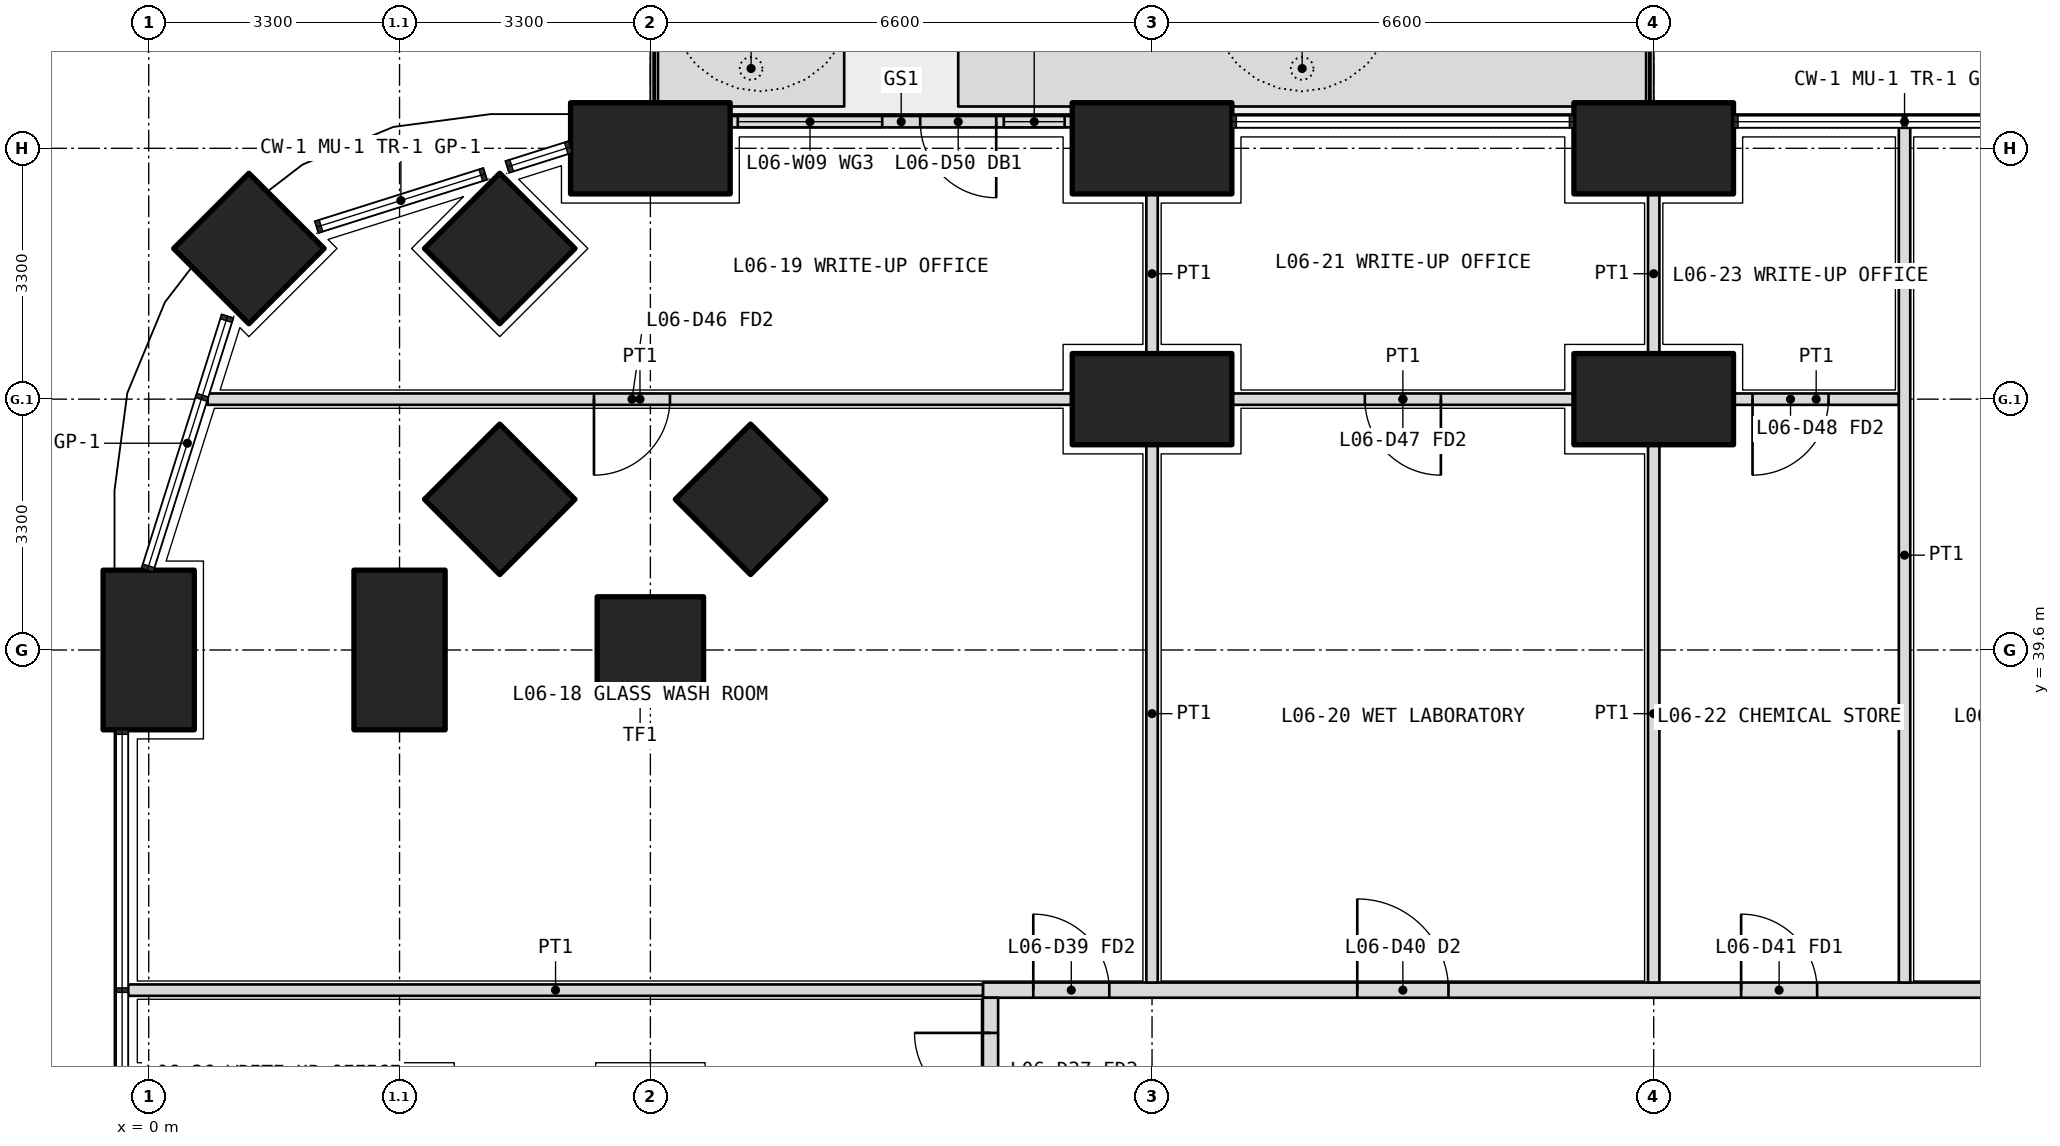
"""IFC4 building model, lengths in metres.
Left out: names, types, materials, properties, quantities, classifications, styles, units other than length and angle.
Written with IfcOpenShell. Run it as: python <this file> out.ifc"""

import sys

from ifc_helpers import new_model, si_unit, direction, frame, frame_2d, origin, origin_2d, place, context, subcontext, project, spatial, polyline, rectangle, outline, extrude, element, fill, save


model = new_model("IFC4")
c1 = context("Model", 3, precision=1e-05, world=origin(), true_north=direction((0.0, 1.0)))
c2 = subcontext(c1, "Body", "Model", "MODEL_VIEW")
j1 = project(units=[si_unit("LENGTHUNIT", "METRE"), si_unit("PLANEANGLEUNIT", "RADIAN")], contexts=[c1])
p1 = place(None, origin())
s1 = spatial("IfcSite", under=j1, at=p1, CompositionType="ELEMENT")
p2 = place(p1, origin())
s2 = spatial("IfcBuilding", under=s1, at=p2, CompositionType="ELEMENT")
p3 = place(p2, frame((0.0, 0.0, 29.7)))
s3 = spatial("IfcBuildingStorey", under=s2, at=p3, CompositionType="ELEMENT", Elevation=29.7)
p4 = place(p3, frame((1.318, 44.882, 0.0), z_axis=(0.0, 0.0, 1.0), x_axis=(0.707106781187, 0.707106781187, 0.0)))
e1 = element("IfcColumn", 1, at=p4, inside=s3, PredefinedType="COLUMN", context=c2, shape_type="SweptSolid", body=[
    extrude(rectangle(XDim=1.4, YDim=1.4, at=origin_2d()), origin(), (0.0, 0.0, 1.0), 4.2),
])
for number, where, z_axis, x_axis in (
    (2, (0.0, 39.6, 0.0), (0.0, 0.0, 1.0), (0.0, 1.0, 0.0)),
    (3, (6.6, 46.2, 0.0), (0.0, 0.0, 1.0), (1.0, 0.0, 0.0)),
    (4, (13.2, 46.2, 0.0), (0.0, 0.0, 1.0), (1.0, 0.0, 0.0)),
    (5, (19.8, 46.2, 0.0), (0.0, 0.0, 1.0), (1.0, 0.0, 0.0)),
):
    element("IfcColumn", number, at=place(p3, frame(where, z_axis=z_axis, x_axis=x_axis)), inside=s3, PredefinedType="COLUMN", context=c2, shape_type="SweptSolid", body=[
        extrude(rectangle(XDim=2.1, YDim=1.2, at=origin_2d()), origin(), (0.0, 0.0, 1.0), 4.2),
    ])
for number, where, z_axis, x_axis in (
    (6, (6.6, 39.6, 0.0), (0.0, 0.0, 1.0), (1.0, 0.0, 0.0)),
    (7, (4.618, 44.882, 0.0), (0.0, 0.0, 1.0), (0.707, 0.707, 0.0)),
):
    element("IfcColumn", number, at=place(p3, frame(where, z_axis=z_axis, x_axis=x_axis)), inside=s3, PredefinedType="COLUMN", context=c2, shape_type="SweptSolid", body=[
        extrude(rectangle(XDim=1.4, YDim=1.4, at=origin_2d()), origin(), (0.0, 0.0, 1.0), 4.2),
    ])
p5 = place(p3, frame((3.3, 39.6, 0.0), z_axis=(0.0, 0.0, 1.0), x_axis=(0.0, 1.0, 0.0)))
e8 = element("IfcColumn", 8, at=p5, inside=s3, PredefinedType="COLUMN", context=c2, shape_type="SweptSolid", body=[
    extrude(rectangle(XDim=2.1, YDim=1.2, at=origin_2d()), origin(), (0.0, 0.0, 1.0), 4.2),
])
p6 = place(p3, frame((4.618, 41.582, 0.0), z_axis=(0.0, 0.0, 1.0), x_axis=(0.707106781187, 0.707106781187, 0.0)))
e9 = element("IfcColumn", 9, at=p6, inside=s3, PredefinedType="COLUMN", context=c2, shape_type="SweptSolid", body=[
    extrude(rectangle(XDim=1.4, YDim=1.4, at=origin_2d()), origin(), (0.0, 0.0, 1.0), 4.2),
])
for number, where, z_axis, x_axis in (
    (10, (13.2, 42.9, 0.0), (0.0, 0.0, 1.0), (1.0, 0.0, 0.0)),
    (11, (19.8, 42.9, 0.0), (0.0, 0.0, 1.0), (1.0, 0.0, 0.0)),
):
    element("IfcColumn", number, at=place(p3, frame(where, z_axis=z_axis, x_axis=x_axis)), inside=s3, PredefinedType="COLUMN", context=c2, shape_type="SweptSolid", body=[
        extrude(rectangle(XDim=2.1, YDim=1.2, at=origin_2d()), origin(), (0.0, 0.0, 1.0), 4.2),
    ])
p7 = place(p3, frame((7.918, 41.582, 0.0), z_axis=(0.0, 0.0, 1.0), x_axis=(0.707106781187, 0.707106781187, 0.0)))
e12 = element("IfcColumn", 12, at=p7, inside=s3, PredefinedType="COLUMN", context=c2, shape_type="SweptSolid", body=[
    extrude(rectangle(XDim=1.4, YDim=1.4, at=origin_2d()), origin(), (0.0, 0.0, 1.0), 4.2),
])
p8 = place(p3, origin())
e13 = element("IfcWall", 13, at=p8, inside=s3, PredefinedType="USERDEFINED", context=c2, shape_type="SweptSolid", body=[
    extrude(outline(polyline([(6.7, 46.75), (9.15, 46.75), (9.15, 47.75), (6.7, 47.75), (6.7, 46.75)]), holes=[polyline([(6.85, 46.9), (9.0, 46.9), (9.0, 47.6), (6.85, 47.6), (6.85, 46.9)])]), origin(), (0.0, 0.0, 1.0), 1.05),
])
p9 = place(p3, origin())
e14 = element("IfcWall", 14, at=p9, inside=s3, PredefinedType="USERDEFINED", context=c2, shape_type="SweptSolid", body=[
    extrude(outline(polyline([(10.65, 46.75), (19.7, 46.75), (19.7, 47.75), (10.65, 47.75), (10.65, 46.75)]), holes=[polyline([(10.8, 46.9), (19.55, 46.9), (19.55, 47.6), (10.8, 47.6), (10.8, 46.9)])]), origin(), (0.0, 0.0, 1.0), 1.05),
])
p10 = place(p3, frame((12.15, 46.55, 0.0), z_axis=(0.0, 0.0, 1.0), x_axis=(-1.0, 0.0, 0.0)))
e15 = element("IfcWall", 15, at=p10, inside=s3, PredefinedType="SOLIDWALL", context=c2, shape_type="SweptSolid", body=[
    extrude(rectangle(XDim=4.5, YDim=0.15, at=frame_2d((2.25, 0.0))), origin(), (0.0, 0.0, 1.0), 2.7),
])
p11 = place(p10, frame((1.0, 0.0, 0.0)))
e16 = element("IfcOpeningElement", 16, at=p11, cuts=e15, PredefinedType="OPENING", context=c2, shape_type="SweptSolid", body=[
    extrude(rectangle(XDim=1.0, YDim=2.4, at=frame_2d((0.5, 1.2))), frame((0.0, 0.085, 0.0), z_axis=(0.0, -1.0, 0.0), x_axis=(1.0, 0.0, 0.0)), (0.0, 0.0, 1.0), 0.17),
])
p12 = place(p10, frame((0.1, 0.0, 0.1)))
e17 = element("IfcOpeningElement", 17, at=p12, cuts=e15, PredefinedType="OPENING", context=c2, shape_type="SweptSolid", body=[
    extrude(rectangle(XDim=0.8, YDim=2.3, at=frame_2d((0.4, 1.15))), frame((0.0, 0.085, 0.0), z_axis=(0.0, -1.0, 0.0), x_axis=(1.0, 0.0, 0.0)), (0.0, 0.0, 1.0), 0.17),
])
p13 = place(p10, frame((2.5, 0.0, 0.1)))
e18 = element("IfcOpeningElement", 18, at=p13, cuts=e15, PredefinedType="OPENING", context=c2, shape_type="SweptSolid", body=[
    extrude(rectangle(XDim=1.9, YDim=2.3, at=frame_2d((0.95, 1.15))), frame((0.0, 0.085, 0.0), z_axis=(0.0, -1.0, 0.0), x_axis=(1.0, 0.0, 0.0)), (0.0, 0.0, 1.0), 0.17),
])
p14 = place(p3, frame((10.975, 35.125, 0.0), z_axis=(0.0, 0.0, 1.0), x_axis=(1.0, 0.0, 0.0)))
e19 = element("IfcWall", 19, at=p14, inside=s3, PredefinedType="PARTITIONING", context=c2, shape_type="SweptSolid", body=[
    extrude(rectangle(XDim=30.85, YDim=0.2, at=frame_2d((15.425, 0.0))), origin(), (0.0, 0.0, 1.0), 2.85),
])
p15 = place(p14, frame((0.663, 0.0, 0.0)))
e20 = element("IfcOpeningElement", 20, at=p15, cuts=e19, PredefinedType="OPENING", context=c2, shape_type="SweptSolid", body=[
    extrude(rectangle(XDim=1.0, YDim=2.1, at=frame_2d((0.5, 1.05))), frame((0.0, 0.11, 0.0), z_axis=(0.0, -1.0, 0.0), x_axis=(1.0, 0.0, 0.0)), (0.0, 0.0, 1.0), 0.22),
])
p16 = place(p14, frame((4.925, 0.0, 0.0)))
e21 = element("IfcOpeningElement", 21, at=p16, cuts=e19, PredefinedType="OPENING", context=c2, shape_type="SweptSolid", body=[
    extrude(rectangle(XDim=1.2, YDim=2.1, at=frame_2d((0.6, 1.05))), frame((0.0, 0.11, 0.0), z_axis=(0.0, -1.0, 0.0), x_axis=(1.0, 0.0, 0.0)), (0.0, 0.0, 1.0), 0.22),
])
p17 = place(p14, frame((9.975, 0.0, 0.0)))
e22 = element("IfcOpeningElement", 22, at=p17, cuts=e19, PredefinedType="OPENING", context=c2, shape_type="SweptSolid", body=[
    extrude(rectangle(XDim=1.0, YDim=2.1, at=frame_2d((0.5, 1.05))), frame((0.0, 0.11, 0.0), z_axis=(0.0, -1.0, 0.0), x_axis=(1.0, 0.0, 0.0)), (0.0, 0.0, 1.0), 0.22),
])
p18 = place(p14, frame((13.725, 0.0, 0.0)))
e23 = element("IfcOpeningElement", 23, at=p18, cuts=e19, PredefinedType="OPENING", context=c2, shape_type="SweptSolid", body=[
    extrude(rectangle(XDim=1.0, YDim=2.1, at=frame_2d((0.5, 1.05))), frame((0.0, 0.11, 0.0), z_axis=(0.0, -1.0, 0.0), x_axis=(1.0, 0.0, 0.0)), (0.0, 0.0, 1.0), 0.22),
])
p19 = place(p14, frame((17.025, 0.0, 0.0)))
e24 = element("IfcOpeningElement", 24, at=p19, cuts=e19, PredefinedType="OPENING", context=c2, shape_type="SweptSolid", body=[
    extrude(rectangle(XDim=1.0, YDim=2.1, at=frame_2d((0.5, 1.05))), frame((0.0, 0.11, 0.0), z_axis=(0.0, -1.0, 0.0), x_axis=(1.0, 0.0, 0.0)), (0.0, 0.0, 1.0), 0.22),
])
p20 = place(p14, frame((24.137, 0.0, 0.0)))
e25 = element("IfcOpeningElement", 25, at=p20, cuts=e19, PredefinedType="OPENING", context=c2, shape_type="SweptSolid", body=[
    extrude(rectangle(XDim=1.2, YDim=2.1, at=frame_2d((0.6, 1.05))), frame((0.0, 0.11, 0.0), z_axis=(0.0, -1.0, 0.0), x_axis=(1.0, 0.0, 0.0)), (0.0, 0.0, 1.0), 0.22),
])
p21 = place(p3, frame((11.075, 11.175, 0.0), z_axis=(0.0, 0.0, 1.0), x_axis=(0.0, 1.0, 0.0)))
e26 = element("IfcWall", 26, at=p21, inside=s3, PredefinedType="PARTITIONING", context=c2, shape_type="SweptSolid", body=[
    extrude(rectangle(XDim=23.85, YDim=0.2, at=frame_2d((11.925, 0.0))), origin(), (0.0, 0.0, 1.0), 2.85),
])
p22 = place(p21, frame((0.363, 0.0, 0.0)))
e27 = element("IfcOpeningElement", 27, at=p22, cuts=e26, PredefinedType="OPENING", context=c2, shape_type="SweptSolid", body=[
    extrude(rectangle(XDim=1.2, YDim=2.1, at=frame_2d((0.6, 1.05))), frame((0.0, 0.11, 0.0), z_axis=(0.0, -1.0, 0.0), x_axis=(1.0, 0.0, 0.0)), (0.0, 0.0, 1.0), 0.22),
])
p23 = place(p21, frame((2.575, 0.0, 0.0)))
e28 = element("IfcOpeningElement", 28, at=p23, cuts=e26, PredefinedType="OPENING", context=c2, shape_type="SweptSolid", body=[
    extrude(rectangle(XDim=1.0, YDim=2.1, at=frame_2d((0.5, 1.05))), frame((0.0, 0.11, 0.0), z_axis=(0.0, -1.0, 0.0), x_axis=(1.0, 0.0, 0.0)), (0.0, 0.0, 1.0), 0.22),
])
p24 = place(p21, frame((5.625, 0.0, 0.0)))
e29 = element("IfcOpeningElement", 29, at=p24, cuts=e26, PredefinedType="OPENING", context=c2, shape_type="SweptSolid", body=[
    extrude(rectangle(XDim=0.9, YDim=2.1, at=frame_2d((0.45, 1.05))), frame((0.0, 0.11, 0.0), z_axis=(0.0, -1.0, 0.0), x_axis=(1.0, 0.0, 0.0)), (0.0, 0.0, 1.0), 0.22),
])
p25 = place(p21, frame((9.425, 0.0, 0.0)))
e30 = element("IfcOpeningElement", 30, at=p25, cuts=e26, PredefinedType="OPENING", context=c2, shape_type="SweptSolid", body=[
    extrude(rectangle(XDim=0.9, YDim=2.1, at=frame_2d((0.45, 1.05))), frame((0.0, 0.11, 0.0), z_axis=(0.0, -1.0, 0.0), x_axis=(1.0, 0.0, 0.0)), (0.0, 0.0, 1.0), 0.22),
])
p26 = place(p21, frame((12.975, 0.0, 0.0)))
e31 = element("IfcOpeningElement", 31, at=p26, cuts=e26, PredefinedType="OPENING", context=c2, shape_type="SweptSolid", body=[
    extrude(rectangle(XDim=1.0, YDim=2.1, at=frame_2d((0.5, 1.05))), frame((0.0, 0.11, 0.0), z_axis=(0.0, -1.0, 0.0), x_axis=(1.0, 0.0, 0.0)), (0.0, 0.0, 1.0), 0.22),
])
p27 = place(p21, frame((17.925, 0.0, 0.0)))
e32 = element("IfcOpeningElement", 32, at=p27, cuts=e26, PredefinedType="OPENING", context=c2, shape_type="SweptSolid", body=[
    extrude(rectangle(XDim=1.2, YDim=2.1, at=frame_2d((0.6, 1.05))), frame((0.0, 0.11, 0.0), z_axis=(0.0, -1.0, 0.0), x_axis=(1.0, 0.0, 0.0)), (0.0, 0.0, 1.0), 0.22),
])
p28 = place(p21, frame((22.387, 0.0, 0.0)))
e33 = element("IfcOpeningElement", 33, at=p28, cuts=e26, PredefinedType="OPENING", context=c2, shape_type="SweptSolid", body=[
    extrude(rectangle(XDim=1.0, YDim=2.1, at=frame_2d((0.5, 1.05))), frame((0.0, 0.11, 0.0), z_axis=(0.0, -1.0, 0.0), x_axis=(1.0, 0.0, 0.0)), (0.0, 0.0, 1.0), 0.22),
])
p29 = place(p3, frame((-0.27, 35.125, 0.0), z_axis=(0.0, 0.0, 1.0), x_axis=(1.0, 0.0, 0.0)))
e34 = element("IfcWall", 34, at=p29, inside=s3, PredefinedType="PARTITIONING", context=c2, shape_type="SweptSolid", body=[
    extrude(rectangle(XDim=11.245, YDim=0.15, at=frame_2d((5.623, 0.0))), origin(), (0.0, 0.0, 1.0), 2.7),
])
p30 = place(p3, frame((23.025, 42.9, 0.0), z_axis=(0.0, 0.0, 1.0), x_axis=(-1.0, 0.0, 0.0)))
e35 = element("IfcWall", 35, at=p30, inside=s3, PredefinedType="PARTITIONING", context=c2, shape_type="SweptSolid", body=[
    extrude(rectangle(XDim=2.175, YDim=0.15, at=frame_2d((1.087, 0.0))), origin(), (0.0, 0.0, 1.0), 3.9),
])
p31 = place(p30, frame((0.925, 0.0, 0.0)))
e36 = element("IfcOpeningElement", 36, at=p31, cuts=e35, PredefinedType="OPENING", context=c2, shape_type="SweptSolid", body=[
    extrude(rectangle(XDim=1.0, YDim=2.1, at=frame_2d((0.5, 1.05))), frame((0.0, 0.085, 0.0), z_axis=(0.0, -1.0, 0.0), x_axis=(1.0, 0.0, 0.0)), (0.0, 0.0, 1.0), 0.17),
])
p32 = place(p3, frame((18.75, 42.9, 0.0), z_axis=(0.0, 0.0, 1.0), x_axis=(-1.0, 0.0, 0.0)))
e37 = element("IfcWall", 37, at=p32, inside=s3, PredefinedType="PARTITIONING", context=c2, shape_type="SweptSolid", body=[
    extrude(rectangle(XDim=4.5, YDim=0.15, at=frame_2d((2.25, 0.0))), origin(), (0.0, 0.0, 1.0), 3.9),
])
p33 = place(p32, frame((1.75, 0.0, 0.0)))
e38 = element("IfcOpeningElement", 38, at=p33, cuts=e37, PredefinedType="OPENING", context=c2, shape_type="SweptSolid", body=[
    extrude(rectangle(XDim=1.0, YDim=2.1, at=frame_2d((0.5, 1.05))), frame((0.0, 0.085, 0.0), z_axis=(0.0, -1.0, 0.0), x_axis=(1.0, 0.0, 0.0)), (0.0, 0.0, 1.0), 0.17),
])
p34 = place(p3, frame((12.15, 42.9, 0.0), z_axis=(0.0, 0.0, 1.0), x_axis=(-1.0, 0.0, 0.0)))
e39 = element("IfcWall", 39, at=p34, inside=s3, PredefinedType="PARTITIONING", context=c2, shape_type="SweptSolid", body=[
    extrude(rectangle(XDim=11.374, YDim=0.15, at=frame_2d((5.687, 0.0))), origin(), (0.0, 0.0, 1.0), 2.7),
])
p35 = place(p34, frame((5.292, 0.0, 0.0)))
e40 = element("IfcOpeningElement", 40, at=p35, cuts=e39, PredefinedType="OPENING", context=c2, shape_type="SweptSolid", body=[
    extrude(rectangle(XDim=1.0, YDim=2.1, at=frame_2d((0.5, 1.05))), frame((0.0, 0.085, 0.0), z_axis=(0.0, -1.0, 0.0), x_axis=(1.0, 0.0, 0.0)), (0.0, 0.0, 1.0), 0.17),
])
p36 = place(p3, frame((13.2, 45.6, 0.0), z_axis=(0.0, 0.0, 1.0), x_axis=(0.0, -1.0, 0.0)))
e41 = element("IfcWall", 41, at=p36, inside=s3, PredefinedType="PARTITIONING", context=c2, shape_type="SweptSolid", body=[
    extrude(rectangle(XDim=2.1, YDim=0.15, at=frame_2d((1.05, 0.0))), origin(), (0.0, 0.0, 1.0), 2.85),
])
p37 = place(p3, frame((13.2, 42.3, 0.0), z_axis=(0.0, 0.0, 1.0), x_axis=(0.0, -1.0, 0.0)))
e42 = element("IfcWall", 42, at=p37, inside=s3, PredefinedType="PARTITIONING", context=c2, shape_type="SweptSolid", body=[
    extrude(rectangle(XDim=7.075, YDim=0.15, at=frame_2d((3.538, 0.0))), origin(), (0.0, 0.0, 1.0), 2.85),
])
p38 = place(p3, frame((19.8, 45.6, 0.0), z_axis=(0.0, 0.0, 1.0), x_axis=(0.0, -1.0, 0.0)))
e43 = element("IfcWall", 43, at=p38, inside=s3, PredefinedType="PARTITIONING", context=c2, shape_type="SweptSolid", body=[
    extrude(rectangle(XDim=2.1, YDim=0.15, at=frame_2d((1.05, 0.0))), origin(), (0.0, 0.0, 1.0), 2.85),
])
p39 = place(p3, frame((19.8, 42.3, 0.0), z_axis=(0.0, 0.0, 1.0), x_axis=(0.0, -1.0, 0.0)))
e44 = element("IfcWall", 44, at=p39, inside=s3, PredefinedType="PARTITIONING", context=c2, shape_type="SweptSolid", body=[
    extrude(rectangle(XDim=7.075, YDim=0.15, at=frame_2d((3.538, 0.0))), origin(), (0.0, 0.0, 1.0), 2.85),
])
p40 = place(p3, frame((23.1, 46.47, 0.0), z_axis=(0.0, 0.0, 1.0), x_axis=(0.0, -1.0, 0.0)))
e45 = element("IfcWall", 45, at=p40, inside=s3, PredefinedType="PARTITIONING", context=c2, shape_type="SweptSolid", body=[
    extrude(rectangle(XDim=11.245, YDim=0.15, at=frame_2d((5.623, 0.0))), origin(), (0.0, 0.0, 1.0), 2.7),
])
p41 = place(p11, origin())
e46 = element("IfcDoor", 46, at=p41, inside=s3, OperationType="SINGLE_SWING_LEFT", PredefinedType="DOOR", context=c2, shape_type="SweptSolid", body=[
    extrude(rectangle(XDim=1.0, YDim=2.4, at=frame_2d((0.5, 1.2))), frame((0.0, 0.025, 0.0), z_axis=(0.0, -1.0, 0.0), x_axis=(1.0, 0.0, 0.0)), (0.0, 0.0, 1.0), 0.05),
])
fill(e16, e46)
p42 = place(p12, origin())
e47 = element("IfcWindow", 47, at=p42, inside=s3, PartitioningType="SINGLE_PANEL", PredefinedType="WINDOW", context=c2, shape_type="SweptSolid", body=[
    extrude(rectangle(XDim=0.8, YDim=2.3, at=frame_2d((0.4, 1.15))), frame((0.0, 0.03, 0.0), z_axis=(0.0, -1.0, 0.0), x_axis=(1.0, 0.0, 0.0)), (0.0, 0.0, 1.0), 0.06),
])
fill(e17, e47)
p43 = place(p13, origin())
e48 = element("IfcWindow", 48, at=p43, inside=s3, PartitioningType="SINGLE_PANEL", PredefinedType="WINDOW", context=c2, shape_type="SweptSolid", body=[
    extrude(rectangle(XDim=1.9, YDim=2.3, at=frame_2d((0.95, 1.15))), frame((0.0, 0.03, 0.0), z_axis=(0.0, -1.0, 0.0), x_axis=(1.0, 0.0, 0.0)), (0.0, 0.0, 1.0), 0.06),
])
fill(e18, e48)
p44 = place(p15, origin())
e49 = element("IfcDoor", 49, at=p44, inside=s3, OperationType="SINGLE_SWING_LEFT", PredefinedType="DOOR", context=c2, shape_type="SweptSolid", body=[
    extrude(rectangle(XDim=1.0, YDim=2.1, at=frame_2d((0.5, 1.05))), frame((0.0, 0.025, 0.0), z_axis=(0.0, -1.0, 0.0), x_axis=(1.0, 0.0, 0.0)), (0.0, 0.0, 1.0), 0.05),
])
fill(e20, e49)
p45 = place(p35, origin())
e50 = element("IfcDoor", 50, at=p45, inside=s3, OperationType="SINGLE_SWING_RIGHT", PredefinedType="DOOR", context=c2, shape_type="SweptSolid", body=[
    extrude(rectangle(XDim=1.0, YDim=2.1, at=frame_2d((0.5, 1.05))), frame((0.0, 0.025, 0.0), z_axis=(0.0, -1.0, 0.0), x_axis=(1.0, 0.0, 0.0)), (0.0, 0.0, 1.0), 0.05),
])
fill(e40, e50)
p46 = place(p16, origin())
e51 = element("IfcDoor", 51, at=p46, inside=s3, OperationType="DOUBLE_DOOR_SINGLE_SWING", PredefinedType="DOOR", context=c2, shape_type="SweptSolid", body=[
    extrude(rectangle(XDim=1.2, YDim=2.1, at=frame_2d((0.6, 1.05))), frame((0.0, 0.025, 0.0), z_axis=(0.0, -1.0, 0.0), x_axis=(1.0, 0.0, 0.0)), (0.0, 0.0, 1.0), 0.05),
])
fill(e21, e51)
p47 = place(p33, origin())
e52 = element("IfcDoor", 52, at=p47, inside=s3, OperationType="SINGLE_SWING_LEFT", PredefinedType="DOOR", context=c2, shape_type="SweptSolid", body=[
    extrude(rectangle(XDim=1.0, YDim=2.1, at=frame_2d((0.5, 1.05))), frame((0.0, 0.025, 0.0), z_axis=(0.0, -1.0, 0.0), x_axis=(1.0, 0.0, 0.0)), (0.0, 0.0, 1.0), 0.05),
])
fill(e38, e52)
p48 = place(p17, origin())
e53 = element("IfcDoor", 53, at=p48, inside=s3, OperationType="SINGLE_SWING_LEFT", PredefinedType="DOOR", context=c2, shape_type="SweptSolid", body=[
    extrude(rectangle(XDim=1.0, YDim=2.1, at=frame_2d((0.5, 1.05))), frame((0.0, 0.025, 0.0), z_axis=(0.0, -1.0, 0.0), x_axis=(1.0, 0.0, 0.0)), (0.0, 0.0, 1.0), 0.05),
])
fill(e22, e53)
p49 = place(p31, origin())
e54 = element("IfcDoor", 54, at=p49, inside=s3, OperationType="SINGLE_SWING_RIGHT", PredefinedType="DOOR", context=c2, shape_type="SweptSolid", body=[
    extrude(rectangle(XDim=1.0, YDim=2.1, at=frame_2d((0.5, 1.05))), frame((0.0, 0.025, 0.0), z_axis=(0.0, -1.0, 0.0), x_axis=(1.0, 0.0, 0.0)), (0.0, 0.0, 1.0), 0.05),
])
fill(e36, e54)
p50 = place(p28, origin())
e55 = element("IfcDoor", 55, at=p50, inside=s3, OperationType="SINGLE_SWING_RIGHT", PredefinedType="DOOR", context=c2, shape_type="SweptSolid", body=[
    extrude(rectangle(XDim=1.0, YDim=2.1, at=frame_2d((0.5, 1.05))), frame((0.0, 0.025, 0.0), z_axis=(0.0, -1.0, 0.0), x_axis=(1.0, 0.0, 0.0)), (0.0, 0.0, 1.0), 0.05),
])
fill(e33, e55)
save(model, sys.argv[1])
